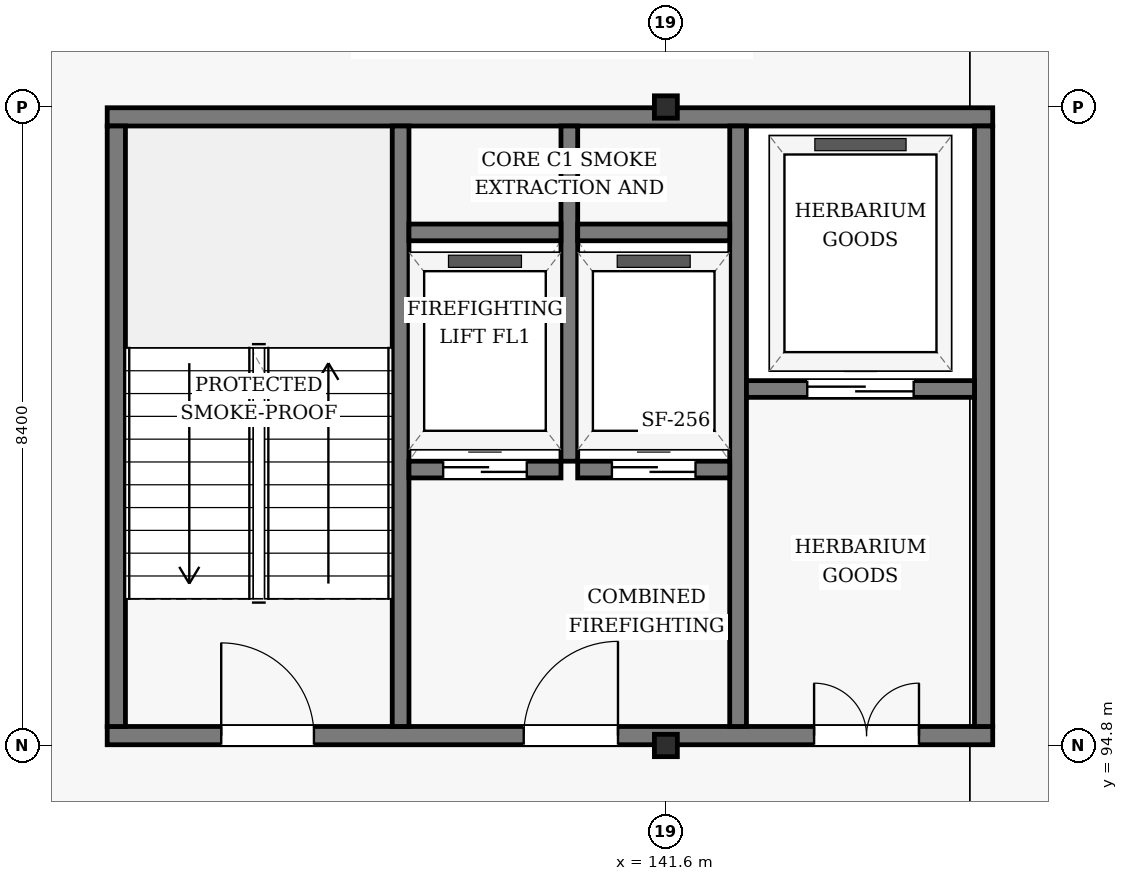
"""IFC4 building model, lengths in metres.
Left out: names, types, materials, properties, quantities, classifications, styles, units other than length and angle.
Written with IfcOpenShell. Run it as: python <this file> out.ifc"""

import sys

from ifc_helpers import new_model, si_unit, direction, frame, frame_2d, origin, origin_2d, place, context, subcontext, project, spatial, rectangle, i_section, extrude, element, fill, save


model = new_model("IFC4")
c1 = context("Model", 3, precision=1e-05, world=origin(), true_north=direction((0.0, 1.0)))
c2 = subcontext(c1, "Body", "Model", "MODEL_VIEW")
j1 = project(units=[si_unit("LENGTHUNIT", "METRE"), si_unit("PLANEANGLEUNIT", "RADIAN")], contexts=[c1])
p1 = place(None, origin())
s1 = spatial("IfcSite", under=j1, at=p1, CompositionType="ELEMENT")
p2 = place(p1, origin())
s2 = spatial("IfcBuilding", under=s1, at=p2, CompositionType="ELEMENT")
p3 = place(p2, frame((0.0, 0.0, 57.6)))
s3 = spatial("IfcBuildingStorey", under=s2, at=p3, CompositionType="ELEMENT", Elevation=57.6)
for number, where, z_axis, x_axis in (
    (1, (141.6, 94.8, 0.0), (0.0, 0.0, 1.0), (1.0, 0.0, 0.0)),
    (2, (141.6, 103.2, 0.0), (0.0, 0.0, 1.0), (1.0, 0.0, 0.0)),
):
    element("IfcColumn", number, at=place(p3, frame(where, z_axis=z_axis, x_axis=x_axis)), inside=s3, PredefinedType="COLUMN", context=c2, shape_type="SweptSolid", body=[
        extrude(i_section(OverallWidth=0.302, OverallDepth=0.294, WebThickness=0.012, FlangeThickness=0.012, FilletRadius=0.018, at=origin_2d()), origin(), (0.0, 0.0, 1.0), 3.6),
    ])
p4 = place(p3, frame((134.25, 94.93, 0.0), z_axis=(0.0, 0.0, 1.0), x_axis=(1.0, 0.0, 0.0)))
e3 = element("IfcWall", 3, at=p4, inside=s3, PredefinedType="SHEAR", context=c2, shape_type="SweptSolid", body=[
    extrude(rectangle(XDim=11.65, YDim=0.24, at=frame_2d((5.825, 0.0))), origin(), (0.0, 0.0, 1.0), 3.33),
])
p5 = place(p4, frame((1.5, 0.0, 0.0)))
e4 = element("IfcOpeningElement", 4, at=p5, cuts=e3, PredefinedType="OPENING", context=c2, shape_type="SweptSolid", body=[
    extrude(rectangle(XDim=1.22, YDim=2.18, at=frame_2d((0.61, 1.09))), frame((0.0, 0.13, 0.0), z_axis=(0.0, -1.0, 0.0), x_axis=(1.0, 0.0, 0.0)), (0.0, 0.0, 1.0), 0.26),
])
p6 = place(p4, frame((5.48, 0.0, 0.0)))
e5 = element("IfcOpeningElement", 5, at=p6, cuts=e3, PredefinedType="OPENING", context=c2, shape_type="SweptSolid", body=[
    extrude(rectangle(XDim=1.24, YDim=2.15, at=frame_2d((0.62, 1.075))), frame((0.0, 0.13, 0.0), z_axis=(0.0, -1.0, 0.0), x_axis=(1.0, 0.0, 0.0)), (0.0, 0.0, 1.0), 0.26),
])
p7 = place(p4, frame((9.3, 0.0, 0.0)))
e6 = element("IfcOpeningElement", 6, at=p7, cuts=e3, PredefinedType="OPENING", context=c2, shape_type="SweptSolid", body=[
    extrude(rectangle(XDim=1.38, YDim=2.15, at=frame_2d((0.69, 1.075))), frame((0.0, 0.13, 0.0), z_axis=(0.0, -1.0, 0.0), x_axis=(1.0, 0.0, 0.0)), (0.0, 0.0, 1.0), 0.26),
])
p8 = place(p3, frame((134.25, 103.07, 0.0), z_axis=(0.0, 0.0, 1.0), x_axis=(1.0, 0.0, 0.0)))
e7 = element("IfcWall", 7, at=p8, inside=s3, PredefinedType="SHEAR", context=c2, shape_type="SweptSolid", body=[
    extrude(rectangle(XDim=11.65, YDim=0.24, at=frame_2d((5.825, 0.0))), origin(), (0.0, 0.0, 1.0), 3.33),
])
p9 = place(p3, frame((134.37, 95.05, 0.0), z_axis=(0.0, 0.0, 1.0), x_axis=(0.0, 1.0, 0.0)))
e8 = element("IfcWall", 8, at=p9, inside=s3, PredefinedType="SHEAR", context=c2, shape_type="SweptSolid", body=[
    extrude(rectangle(XDim=7.9, YDim=0.24, at=frame_2d((3.95, 0.0))), origin(), (0.0, 0.0, 1.0), 3.33),
])
p10 = place(p3, frame((138.11, 95.05, 0.0), z_axis=(0.0, 0.0, 1.0), x_axis=(0.0, 1.0, 0.0)))
e9 = element("IfcWall", 9, at=p10, inside=s3, PredefinedType="SHEAR", context=c2, shape_type="SweptSolid", body=[
    extrude(rectangle(XDim=7.9, YDim=0.22, at=frame_2d((3.95, 0.0))), origin(), (0.0, 0.0, 1.0), 3.33),
])
p11 = place(p3, frame((140.33, 98.54, 0.0), z_axis=(0.0, 0.0, 1.0), x_axis=(0.0, 1.0, 0.0)))
e10 = element("IfcWall", 10, at=p11, inside=s3, PredefinedType="SHEAR", context=c2, shape_type="SweptSolid", body=[
    extrude(rectangle(XDim=4.41, YDim=0.22, at=frame_2d((2.205, 0.0))), origin(), (0.0, 0.0, 1.0), 3.33),
])
p12 = place(p3, frame((142.55, 95.05, 0.0), z_axis=(0.0, 0.0, 1.0), x_axis=(0.0, 1.0, 0.0)))
e11 = element("IfcWall", 11, at=p12, inside=s3, PredefinedType="SHEAR", context=c2, shape_type="SweptSolid", body=[
    extrude(rectangle(XDim=7.9, YDim=0.22, at=frame_2d((3.95, 0.0))), origin(), (0.0, 0.0, 1.0), 3.33),
])
p13 = place(p3, frame((145.78, 95.05, 0.0), z_axis=(0.0, 0.0, 1.0), x_axis=(0.0, 1.0, 0.0)))
e12 = element("IfcWall", 12, at=p13, inside=s3, PredefinedType="SHEAR", context=c2, shape_type="SweptSolid", body=[
    extrude(rectangle(XDim=7.9, YDim=0.24, at=frame_2d((3.95, 0.0))), origin(), (0.0, 0.0, 1.0), 3.33),
])
p14 = place(p3, frame((138.22, 98.43, 0.0), z_axis=(0.0, 0.0, 1.0), x_axis=(1.0, 0.0, 0.0)))
e13 = element("IfcWall", 13, at=p14, inside=s3, PredefinedType="SHEAR", context=c2, shape_type="SweptSolid", body=[
    extrude(rectangle(XDim=2.0, YDim=0.22, at=frame_2d((1.0, 0.0))), origin(), (0.0, 0.0, 1.0), 3.33),
])
p15 = place(p14, frame((0.45, 0.0, 0.0)))
e14 = element("IfcOpeningElement", 14, at=p15, cuts=e13, PredefinedType="OPENING", context=c2, shape_type="SweptSolid", body=[
    extrude(rectangle(XDim=1.1, YDim=2.15, at=frame_2d((0.55, 1.075))), frame((0.0, 0.12, 0.0), z_axis=(0.0, -1.0, 0.0), x_axis=(1.0, 0.0, 0.0)), (0.0, 0.0, 1.0), 0.24),
])
p16 = place(p3, frame((140.44, 98.43, 0.0), z_axis=(0.0, 0.0, 1.0), x_axis=(1.0, 0.0, 0.0)))
e15 = element("IfcWall", 15, at=p16, inside=s3, PredefinedType="SHEAR", context=c2, shape_type="SweptSolid", body=[
    extrude(rectangle(XDim=2.0, YDim=0.22, at=frame_2d((1.0, 0.0))), origin(), (0.0, 0.0, 1.0), 3.33),
])
p17 = place(p16, frame((0.45, 0.0, 0.0)))
e16 = element("IfcOpeningElement", 16, at=p17, cuts=e15, PredefinedType="OPENING", context=c2, shape_type="SweptSolid", body=[
    extrude(rectangle(XDim=1.1, YDim=2.15, at=frame_2d((0.55, 1.075))), frame((0.0, 0.12, 0.0), z_axis=(0.0, -1.0, 0.0), x_axis=(1.0, 0.0, 0.0)), (0.0, 0.0, 1.0), 0.24),
])
for number, where, z_axis, x_axis in (
    (17, (138.22, 101.55, 0.0), (0.0, 0.0, 1.0), (1.0, 0.0, 0.0)),
    (18, (140.44, 101.55, 0.0), (0.0, 0.0, 1.0), (1.0, 0.0, 0.0)),
):
    element("IfcWall", number, at=place(p3, frame(where, z_axis=z_axis, x_axis=x_axis)), inside=s3, PredefinedType="SHEAR", context=c2, shape_type="SweptSolid", body=[
        extrude(rectangle(XDim=2.0, YDim=0.22, at=frame_2d((1.0, 0.0))), origin(), (0.0, 0.0, 1.0), 3.33),
    ])
p18 = place(p3, frame((142.66, 99.49, 0.0), z_axis=(0.0, 0.0, 1.0), x_axis=(1.0, 0.0, 0.0)))
e19 = element("IfcWall", 19, at=p18, inside=s3, PredefinedType="SHEAR", context=c2, shape_type="SweptSolid", body=[
    extrude(rectangle(XDim=3.0, YDim=0.22, at=frame_2d((1.5, 0.0))), origin(), (0.0, 0.0, 1.0), 3.33),
])
p19 = place(p18, frame((0.8, 0.0, 0.0)))
e20 = element("IfcOpeningElement", 20, at=p19, cuts=e19, PredefinedType="OPENING", context=c2, shape_type="SweptSolid", body=[
    extrude(rectangle(XDim=1.4, YDim=2.2, at=frame_2d((0.7, 1.1))), frame((0.0, 0.12, 0.0), z_axis=(0.0, -1.0, 0.0), x_axis=(1.0, 0.0, 0.0)), (0.0, 0.0, 1.0), 0.24),
])
p20 = place(p5, origin())
e21 = element("IfcDoor", 21, at=p20, inside=s3, OperationType="SINGLE_SWING_LEFT", PredefinedType="DOOR", context=c2, shape_type="SweptSolid", body=[
    extrude(rectangle(XDim=1.22, YDim=2.18, at=frame_2d((0.61, 1.09))), frame((0.0, 0.025, 0.0), z_axis=(0.0, -1.0, 0.0), x_axis=(1.0, 0.0, 0.0)), (0.0, 0.0, 1.0), 0.05),
])
fill(e4, e21)
p21 = place(p6, frame((1.24, 0.0, 0.0), z_axis=(0.0, 0.0, 1.0), x_axis=(-1.0, 0.0, 0.0)))
e22 = element("IfcDoor", 22, at=p21, inside=s3, OperationType="SINGLE_SWING_RIGHT", PredefinedType="DOOR", context=c2, shape_type="SweptSolid", body=[
    extrude(rectangle(XDim=1.24, YDim=2.15, at=frame_2d((0.62, 1.075))), frame((0.0, 0.025, 0.0), z_axis=(0.0, -1.0, 0.0), x_axis=(1.0, 0.0, 0.0)), (0.0, 0.0, 1.0), 0.05),
])
fill(e5, e22)
p22 = place(p7, frame((1.38, 0.0, 0.0), z_axis=(0.0, 0.0, 1.0), x_axis=(-1.0, 0.0, 0.0)))
e23 = element("IfcDoor", 23, at=p22, inside=s3, OperationType="DOUBLE_DOOR_SINGLE_SWING", PredefinedType="DOOR", context=c2, shape_type="SweptSolid", body=[
    extrude(rectangle(XDim=1.38, YDim=2.15, at=frame_2d((0.69, 1.075))), frame((0.0, 0.025, 0.0), z_axis=(0.0, -1.0, 0.0), x_axis=(1.0, 0.0, 0.0)), (0.0, 0.0, 1.0), 0.05),
])
fill(e6, e23)
p23 = place(p15, origin())
e24 = element("IfcDoor", 24, at=p23, inside=s3, OperationType="SLIDING_TO_LEFT", PredefinedType="DOOR", context=c2, shape_type="SweptSolid", body=[
    extrude(rectangle(XDim=1.1, YDim=2.15, at=frame_2d((0.55, 1.075))), frame((0.0, 0.025, 0.0), z_axis=(0.0, -1.0, 0.0), x_axis=(1.0, 0.0, 0.0)), (0.0, 0.0, 1.0), 0.05),
])
fill(e14, e24)
p24 = place(p17, origin())
e25 = element("IfcDoor", 25, at=p24, inside=s3, OperationType="SLIDING_TO_LEFT", PredefinedType="DOOR", context=c2, shape_type="SweptSolid", body=[
    extrude(rectangle(XDim=1.1, YDim=2.15, at=frame_2d((0.55, 1.075))), frame((0.0, 0.025, 0.0), z_axis=(0.0, -1.0, 0.0), x_axis=(1.0, 0.0, 0.0)), (0.0, 0.0, 1.0), 0.05),
])
fill(e16, e25)
p25 = place(p19, origin())
e26 = element("IfcDoor", 26, at=p25, inside=s3, OperationType="SLIDING_TO_LEFT", PredefinedType="DOOR", context=c2, shape_type="SweptSolid", body=[
    extrude(rectangle(XDim=1.4, YDim=2.2, at=frame_2d((0.7, 1.1))), frame((0.0, 0.025, 0.0), z_axis=(0.0, -1.0, 0.0), x_axis=(1.0, 0.0, 0.0)), (0.0, 0.0, 1.0), 0.05),
])
fill(e20, e26)
save(model, sys.argv[1])
